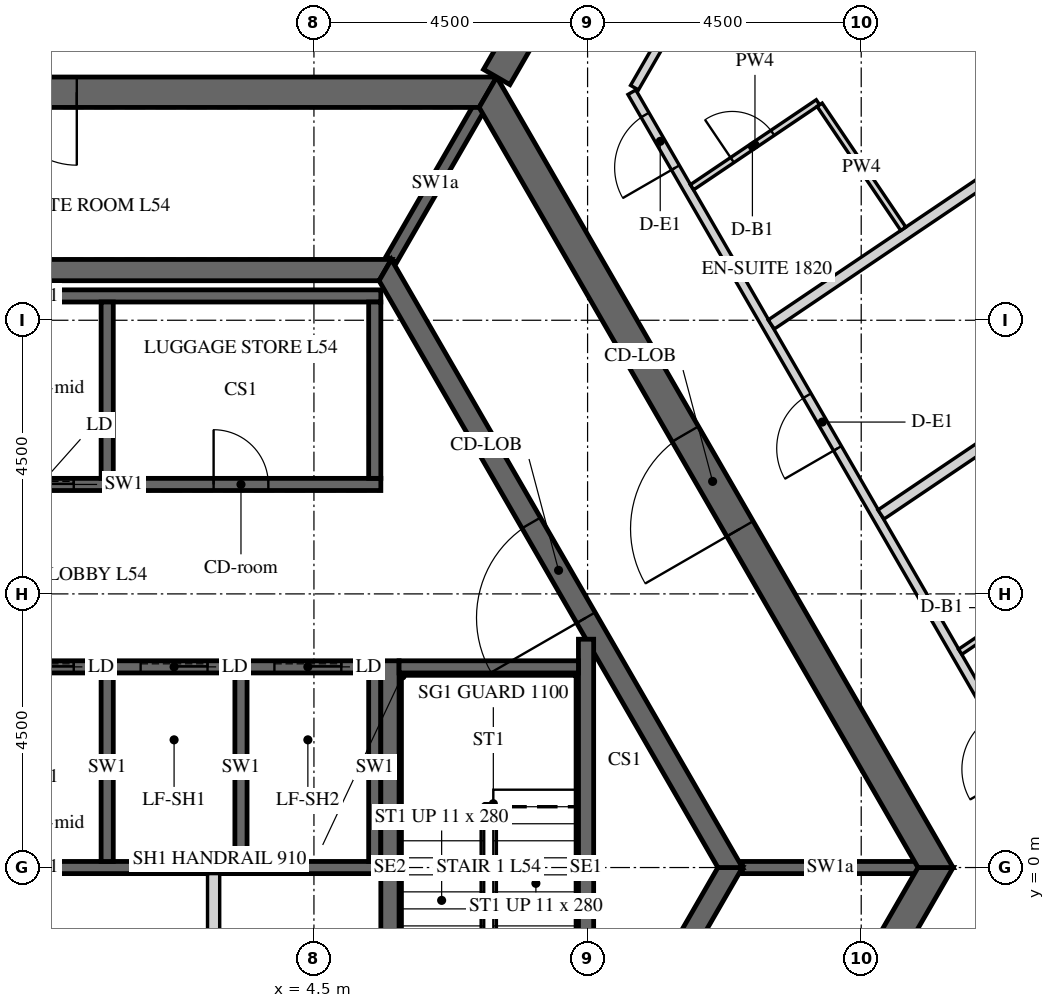
"""IFC4 building model, lengths in metres.
Left out: names, types, materials, properties, quantities, classifications, styles, units other than length and angle.
Written with IfcOpenShell. Run it as: python <this file> out.ifc"""

import sys

from ifc_helpers import new_model, si_unit, direction, frame, frame_2d, origin, place, context, subcontext, project, spatial, polyline, rectangle, outline, extrude, element, fill, save


model = new_model("IFC4")
c1 = context("Model", 3, precision=1e-05, world=origin(), true_north=direction((0.0, 1.0)))
c2 = subcontext(c1, "Body", "Model", "MODEL_VIEW")
j1 = project(units=[si_unit("LENGTHUNIT", "METRE"), si_unit("PLANEANGLEUNIT", "RADIAN")], contexts=[c1])
p1 = place(None, origin())
s1 = spatial("IfcSite", under=j1, at=p1, CompositionType="ELEMENT")
p2 = place(p1, origin())
s2 = spatial("IfcBuilding", under=s1, at=p2, CompositionType="ELEMENT")
p3 = place(p2, frame((0.0, 0.0, 226.8)))
s3 = spatial("IfcBuildingStorey", under=s2, at=p3, CompositionType="ELEMENT", Elevation=226.8)
p4 = place(p3, frame((7.361, -12.75, -0.15), z_axis=(0.0, 0.0, 1.0), x_axis=(0.50000571537, 0.866022103989, 0.0)))
e1 = element("IfcWall", 1, at=p4, inside=s3, PredefinedType="SHEAR", context=c2, shape_type="SweptSolid", body=[
    extrude(outline(polyline([(-0.144, -0.25), (14.867, -0.25), (14.578, 0.25), (0.144, 0.25), (-0.144, -0.25)])), origin(), (0.0, 0.0, 1.0), 3.9),
])
p5 = place(p4, frame((6.49, 0.0, 0.15)))
e2 = element("IfcOpeningElement", 2, at=p5, cuts=e1, PredefinedType="OPENING", context=c2, shape_type="SweptSolid", body=[
    extrude(rectangle(XDim=1.8, YDim=2.4, at=frame_2d((0.9, 1.2))), frame((0.0, 0.26, 0.0), z_axis=(0.0, -1.0, 0.0), x_axis=(1.0, 0.0, 0.0)), (0.0, 0.0, 1.0), 0.52),
])
p6 = place(p3, frame((14.722, 0.0, -0.15), z_axis=(0.0, 0.0, 1.0), x_axis=(-0.50000571537, 0.866022103989, 0.0)))
e3 = element("IfcWall", 3, at=p6, inside=s3, PredefinedType="SHEAR", context=c2, shape_type="SweptSolid", body=[
    extrude(outline(polyline([(-0.144, -0.25), (14.867, -0.25), (14.578, 0.25), (0.144, 0.25), (-0.144, -0.25)])), origin(), (0.0, 0.0, 1.0), 3.9),
])
p7 = place(p6, frame((6.432, 0.0, 0.15)))
e4 = element("IfcOpeningElement", 4, at=p7, cuts=e3, PredefinedType="OPENING", context=c2, shape_type="SweptSolid", body=[
    extrude(rectangle(XDim=1.8, YDim=2.4, at=frame_2d((0.9, 1.2))), frame((0.0, 0.26, 0.0), z_axis=(0.0, -1.0, 0.0), x_axis=(1.0, 0.0, 0.0)), (0.0, 0.0, 1.0), 0.52),
])
p8 = place(p3, frame((7.361, 12.75, -0.15), z_axis=(0.0, 0.0, 1.0), x_axis=(-1.0, 0.0, 0.0)))
e5 = element("IfcWall", 5, at=p8, inside=s3, PredefinedType="SHEAR", context=c2, shape_type="SweptSolid", body=[
    extrude(outline(polyline([(-0.144, -0.25), (14.866, -0.25), (14.578, 0.25), (0.144, 0.25), (-0.144, -0.25)])), origin(), (0.0, 0.0, 1.0), 3.9),
])
p9 = place(p8, frame((6.761, 0.0, 0.15)))
e6 = element("IfcOpeningElement", 6, at=p9, cuts=e5, PredefinedType="OPENING", context=c2, shape_type="SweptSolid", body=[
    extrude(rectangle(XDim=1.2, YDim=2.4, at=frame_2d((0.6, 1.2))), frame((0.0, 0.26, 0.0), z_axis=(0.0, -1.0, 0.0), x_axis=(1.0, 0.0, 0.0)), (0.0, 0.0, 1.0), 0.52),
])
p10 = place(p3, frame((7.506, 13.0, -0.15), z_axis=(0.0, 0.0, 1.0), x_axis=(0.499988271576, 0.866032175087, 0.0)))
e7 = element("IfcWall", 7, at=p10, inside=s3, PredefinedType="SHEAR", context=c2, shape_type="SweptSolid", body=[
    extrude(rectangle(XDim=15.424, YDim=0.5, at=frame_2d((7.712, 0.0))), origin(), (0.0, 0.0, 1.0), 3.9),
])
p11 = place(p10, frame((6.812, 0.0, 0.15)))
e8 = element("IfcOpeningElement", 8, at=p11, cuts=e7, PredefinedType="OPENING", context=c2, shape_type="SweptSolid", body=[
    extrude(rectangle(XDim=1.8, YDim=2.4, at=frame_2d((0.9, 1.2))), frame((0.0, 0.26, 0.0), z_axis=(0.0, -1.0, 0.0), x_axis=(1.0, 0.0, 0.0)), (0.0, 0.0, 1.0), 0.52),
])
p12 = place(p3, frame((5.673, -9.825, -0.15), z_axis=(0.0, 0.0, 1.0), x_axis=(0.499995046907, 0.866028263435, 0.0)))
e9 = element("IfcWall", 9, at=p12, inside=s3, PredefinedType="SHEAR", context=c2, shape_type="SweptSolid", body=[
    extrude(outline(polyline([(-0.101, -0.175), (11.446, -0.175), (11.244, 0.175), (0.101, 0.175), (-0.101, -0.175)])), origin(), (0.0, 0.0, 1.0), 3.9),
])
p13 = place(p12, frame((4.801, 0.0, 0.15)))
e10 = element("IfcOpeningElement", 10, at=p13, cuts=e9, PredefinedType="OPENING", context=c2, shape_type="SweptSolid", body=[
    extrude(rectangle(XDim=1.8, YDim=2.4, at=frame_2d((0.9, 1.2))), frame((0.0, 0.185, 0.0), z_axis=(0.0, -1.0, 0.0), x_axis=(1.0, 0.0, 0.0)), (0.0, 0.0, 1.0), 0.37),
])
p14 = place(p3, frame((11.345, 0.0, -0.15), z_axis=(0.0, 0.0, 1.0), x_axis=(-0.499995046907, 0.866028263435, 0.0)))
e11 = element("IfcWall", 11, at=p14, inside=s3, PredefinedType="SHEAR", context=c2, shape_type="SweptSolid", body=[
    extrude(outline(polyline([(-0.101, -0.175), (11.446, -0.175), (11.244, 0.175), (0.101, 0.175), (-0.101, -0.175)])), origin(), (0.0, 0.0, 1.0), 3.9),
])
p15 = place(p14, frame((4.744, 0.0, 0.15)))
e12 = element("IfcOpeningElement", 12, at=p15, cuts=e11, PredefinedType="OPENING", context=c2, shape_type="SweptSolid", body=[
    extrude(rectangle(XDim=1.8, YDim=2.4, at=frame_2d((0.9, 1.2))), frame((0.0, 0.185, 0.0), z_axis=(0.0, -1.0, 0.0), x_axis=(1.0, 0.0, 0.0)), (0.0, 0.0, 1.0), 0.37),
])
p16 = place(p3, frame((5.673, 9.825, -0.15), z_axis=(0.0, 0.0, 1.0), x_axis=(-1.0, 0.0, 0.0)))
e13 = element("IfcWall", 13, at=p16, inside=s3, PredefinedType="SHEAR", context=c2, shape_type="SweptSolid", body=[
    extrude(outline(polyline([(-0.101, -0.175), (11.446, -0.175), (11.244, 0.175), (0.101, 0.175), (-0.101, -0.175)])), origin(), (0.0, 0.0, 1.0), 3.9),
])
p17 = place(p3, frame((-5.6, 6.3, -0.25), z_axis=(0.0, 0.0, 1.0), x_axis=(1.0, 0.0, 0.0)))
e14 = element("IfcWall", 14, at=p17, inside=s3, PredefinedType="SHEAR", context=c2, shape_type="SweptSolid", body=[
    extrude(rectangle(XDim=11.2, YDim=0.2, at=frame_2d((5.6, 0.0))), origin(), (0.0, 0.0, 1.0), 3.9),
])
p18 = place(p17, frame((8.45, 0.0, 0.25)))
e15 = element("IfcOpeningElement", 15, at=p18, cuts=e14, PredefinedType="OPENING", context=c2, shape_type="SweptSolid", body=[
    extrude(rectangle(XDim=0.9, YDim=2.1, at=frame_2d((0.45, 1.05))), frame((0.0, 0.11, 0.0), z_axis=(0.0, -1.0, 0.0), x_axis=(1.0, 0.0, 0.0)), (0.0, 0.0, 1.0), 0.22),
])
p19 = place(p17, frame((0.65, 0.0, 0.25)))
e16 = element("IfcOpeningElement", 16, at=p19, cuts=e14, PredefinedType="OPENING", context=c2, shape_type="SweptSolid", body=[
    extrude(rectangle(XDim=1.1, YDim=2.1, at=frame_2d((0.55, 1.05))), frame((0.0, 0.11, 0.0), z_axis=(0.0, -1.0, 0.0), x_axis=(1.0, 0.0, 0.0)), (0.0, 0.0, 1.0), 0.22),
])
p20 = place(p17, frame((2.85, 0.0, 0.25)))
e17 = element("IfcOpeningElement", 17, at=p20, cuts=e14, PredefinedType="OPENING", context=c2, shape_type="SweptSolid", body=[
    extrude(rectangle(XDim=1.1, YDim=2.1, at=frame_2d((0.55, 1.05))), frame((0.0, 0.11, 0.0), z_axis=(0.0, -1.0, 0.0), x_axis=(1.0, 0.0, 0.0)), (0.0, 0.0, 1.0), 0.22),
])
p21 = place(p17, frame((5.05, 0.0, 0.25)))
e18 = element("IfcOpeningElement", 18, at=p21, cuts=e14, PredefinedType="OPENING", context=c2, shape_type="SweptSolid", body=[
    extrude(rectangle(XDim=1.1, YDim=2.1, at=frame_2d((0.55, 1.05))), frame((0.0, 0.11, 0.0), z_axis=(0.0, -1.0, 0.0), x_axis=(1.0, 0.0, 0.0)), (0.0, 0.0, 1.0), 0.22),
])
p22 = place(p3, frame((-5.6, 9.4, -0.25), z_axis=(0.0, 0.0, 1.0), x_axis=(1.0, 0.0, 0.0)))
e19 = element("IfcWall", 19, at=p22, inside=s3, PredefinedType="SHEAR", context=c2, shape_type="SweptSolid", body=[
    extrude(rectangle(XDim=11.2, YDim=0.2, at=frame_2d((5.6, 0.0))), origin(), (0.0, 0.0, 1.0), 3.9),
])
for number, where, z_axis, x_axis in (
    (20, (1.1, 6.4, -0.25), (0.0, 0.0, 1.0), (0.0, 1.0, 0.0)),
    (21, (5.5, 6.4, -0.25), (0.0, 0.0, 1.0), (0.0, 1.0, 0.0)),
):
    element("IfcWall", number, at=place(p3, frame(where, z_axis=z_axis, x_axis=x_axis)), inside=s3, PredefinedType="SHEAR", context=c2, shape_type="SweptSolid", body=[
        extrude(rectangle(XDim=2.9, YDim=0.2, at=frame_2d((1.45, 0.0))), origin(), (0.0, 0.0, 1.0), 3.9),
    ])
p23 = place(p3, frame((-5.6, 3.3, -0.25), z_axis=(0.0, 0.0, 1.0), x_axis=(1.0, 0.0, 0.0)))
e22 = element("IfcWall", 22, at=p23, inside=s3, PredefinedType="SHEAR", context=c2, shape_type="SweptSolid", body=[
    extrude(rectangle(XDim=11.2, YDim=0.2, at=frame_2d((5.6, 0.0))), origin(), (0.0, 0.0, 1.0), 3.9),
])
p24 = place(p23, frame((0.65, 0.0, 0.25)))
e23 = element("IfcOpeningElement", 23, at=p24, cuts=e22, PredefinedType="OPENING", context=c2, shape_type="SweptSolid", body=[
    extrude(rectangle(XDim=1.1, YDim=2.1, at=frame_2d((0.55, 1.05))), frame((0.0, 0.11, 0.0), z_axis=(0.0, -1.0, 0.0), x_axis=(1.0, 0.0, 0.0)), (0.0, 0.0, 1.0), 0.22),
])
p25 = place(p23, frame((2.85, 0.0, 0.25)))
e24 = element("IfcOpeningElement", 24, at=p25, cuts=e22, PredefinedType="OPENING", context=c2, shape_type="SweptSolid", body=[
    extrude(rectangle(XDim=1.1, YDim=2.1, at=frame_2d((0.55, 1.05))), frame((0.0, 0.11, 0.0), z_axis=(0.0, -1.0, 0.0), x_axis=(1.0, 0.0, 0.0)), (0.0, 0.0, 1.0), 0.22),
])
p26 = place(p23, frame((5.05, 0.0, 0.25)))
e25 = element("IfcOpeningElement", 25, at=p26, cuts=e22, PredefinedType="OPENING", context=c2, shape_type="SweptSolid", body=[
    extrude(rectangle(XDim=1.1, YDim=2.1, at=frame_2d((0.55, 1.05))), frame((0.0, 0.11, 0.0), z_axis=(0.0, -1.0, 0.0), x_axis=(1.0, 0.0, 0.0)), (0.0, 0.0, 1.0), 0.22),
])
p27 = place(p23, frame((7.25, 0.0, 0.25)))
e26 = element("IfcOpeningElement", 26, at=p27, cuts=e22, PredefinedType="OPENING", context=c2, shape_type="SweptSolid", body=[
    extrude(rectangle(XDim=1.1, YDim=2.1, at=frame_2d((0.55, 1.05))), frame((0.0, 0.11, 0.0), z_axis=(0.0, -1.0, 0.0), x_axis=(1.0, 0.0, 0.0)), (0.0, 0.0, 1.0), 0.22),
])
p28 = place(p23, frame((9.45, 0.0, 0.25)))
e27 = element("IfcOpeningElement", 27, at=p28, cuts=e22, PredefinedType="OPENING", context=c2, shape_type="SweptSolid", body=[
    extrude(rectangle(XDim=1.1, YDim=2.1, at=frame_2d((0.55, 1.05))), frame((0.0, 0.11, 0.0), z_axis=(0.0, -1.0, 0.0), x_axis=(1.0, 0.0, 0.0)), (0.0, 0.0, 1.0), 0.22),
])
p29 = place(p3, frame((-5.6, 0.0, -0.25), z_axis=(0.0, 0.0, 1.0), x_axis=(1.0, 0.0, 0.0)))
e28 = element("IfcWall", 28, at=p29, inside=s3, PredefinedType="SHEAR", context=c2, shape_type="SweptSolid", body=[
    extrude(rectangle(XDim=11.2, YDim=0.2, at=frame_2d((5.6, 0.0))), origin(), (0.0, 0.0, 1.0), 3.9),
])
for number, where, z_axis, x_axis in (
    (29, (1.1, 0.1, -0.25), (0.0, 0.0, 1.0), (0.0, 1.0, 0.0)),
    (30, (3.3, 0.1, -0.25), (0.0, 0.0, 1.0), (0.0, 1.0, 0.0)),
    (31, (5.5, 0.1, -0.25), (0.0, 0.0, 1.0), (0.0, 1.0, 0.0)),
):
    element("IfcWall", number, at=place(p3, frame(where, z_axis=z_axis, x_axis=x_axis)), inside=s3, PredefinedType="SHEAR", context=c2, shape_type="SweptSolid", body=[
        extrude(rectangle(XDim=3.1, YDim=0.2, at=frame_2d((1.55, 0.0))), origin(), (0.0, 0.0, 1.0), 3.9),
    ])
p30 = place(p3, frame((2.85, -3.2, 0.0), z_axis=(0.0, 0.0, 1.0), x_axis=(0.0, 1.0, 0.0)))
e32 = element("IfcWall", 32, at=p30, inside=s3, PredefinedType="PARTITIONING", context=c2, shape_type="SweptSolid", body=[
    extrude(rectangle(XDim=3.1, YDim=0.2, at=frame_2d((1.55, 0.0))), origin(), (0.0, 0.0, 1.0), 3.65),
])
for number, where, z_axis, x_axis in (
    (33, (11.547, 0.0, -0.15), (0.0, 0.0, 1.0), (1.0, 0.0, 0.0)),
    (34, (5.773, 10.0, -0.15), (0.0, 0.0, 1.0), (0.5, 0.866, 0.0)),
):
    element("IfcWall", number, at=place(p3, frame(where, z_axis=z_axis, x_axis=x_axis)), inside=s3, PredefinedType="SHEAR", context=c2, shape_type="SweptSolid", body=[
        extrude(rectangle(XDim=2.887, YDim=0.2, at=frame_2d((1.443, 0.0))), origin(), (0.0, 0.0, 1.0), 3.9),
    ])
p31 = place(p3, frame((5.75, -3.4, -0.25), z_axis=(0.0, 0.0, 1.0), x_axis=(0.0, 1.0, 0.0)))
e35 = element("IfcWall", 35, at=p31, inside=s3, PredefinedType="SHEAR", context=c2, shape_type="SweptSolid", body=[
    extrude(rectangle(XDim=6.8, YDim=0.3, at=frame_2d((3.4, 0.0))), origin(), (0.0, 0.0, 1.0), 3.9),
])
p32 = place(p3, frame((8.975, -3.755, -0.25), z_axis=(0.0, 0.0, 1.0), x_axis=(0.0, 1.0, 0.0)))
e36 = element("IfcWall", 36, at=p32, inside=s3, PredefinedType="SHEAR", context=c2, shape_type="SweptSolid", body=[
    extrude(rectangle(XDim=7.51, YDim=0.25, at=frame_2d((3.755, 0.0))), origin(), (0.0, 0.0, 1.0), 3.9),
])
p33 = place(p3, frame((5.9, 3.3, -0.25), z_axis=(0.0, 0.0, 1.0), x_axis=(1.0, 0.0, 0.0)))
e37 = element("IfcWall", 37, at=p33, inside=s3, PredefinedType="SHEAR", context=c2, shape_type="SweptSolid", body=[
    extrude(rectangle(XDim=2.95, YDim=0.2, at=frame_2d((1.475, 0.0))), origin(), (0.0, 0.0, 1.0), 3.9),
])
p34 = place(p3, frame((9.772, -12.675, 0.0), z_axis=(0.0, 0.0, 1.0), x_axis=(0.499996322767, 0.866027526826, 0.0)))
e38 = element("IfcWall", 38, at=p34, inside=s3, PredefinedType="PARTITIONING", context=c2, shape_type="SweptSolid", body=[
    extrude(rectangle(XDim=14.636, YDim=0.15, at=frame_2d((7.318, 0.0))), origin(), (0.0, 0.0, 1.0), 2.988),
])
p35 = place(p34, frame((5.309, 0.0, 0.0)))
e39 = element("IfcOpeningElement", 39, at=p35, cuts=e38, PredefinedType="OPENING", context=c2, shape_type="SweptSolid", body=[
    extrude(rectangle(XDim=1.0, YDim=2.1, at=frame_2d((0.5, 1.05))), frame((0.0, 0.085, 0.0), z_axis=(0.0, -1.0, 0.0), x_axis=(1.0, 0.0, 0.0)), (0.0, 0.0, 1.0), 0.17),
])
p36 = place(p34, frame((13.486, 0.0, 0.0)))
e40 = element("IfcOpeningElement", 40, at=p36, cuts=e38, PredefinedType="OPENING", context=c2, shape_type="SweptSolid", body=[
    extrude(rectangle(XDim=1.0, YDim=2.1, at=frame_2d((0.5, 1.05))), frame((0.0, 0.085, 0.0), z_axis=(0.0, -1.0, 0.0), x_axis=(1.0, 0.0, 0.0)), (0.0, 0.0, 1.0), 0.17),
])
p37 = place(p3, frame((17.046, 0.075, 0.0), z_axis=(0.0, 0.0, 1.0), x_axis=(-0.499996322767, 0.866027526826, 0.0)))
e41 = element("IfcWall", 41, at=p37, inside=s3, PredefinedType="PARTITIONING", context=c2, shape_type="SweptSolid", body=[
    extrude(rectangle(XDim=14.636, YDim=0.15, at=frame_2d((7.318, 0.0))), origin(), (0.0, 0.0, 1.0), 2.988),
])
p38 = place(p37, frame((1.781, 0.0, 0.0)))
e42 = element("IfcOpeningElement", 42, at=p38, cuts=e41, PredefinedType="OPENING", context=c2, shape_type="SweptSolid", body=[
    extrude(rectangle(XDim=1.0, YDim=2.1, at=frame_2d((0.5, 1.05))), frame((0.0, 0.085, 0.0), z_axis=(0.0, -1.0, 0.0), x_axis=(1.0, 0.0, 0.0)), (0.0, 0.0, 1.0), 0.17),
])
p39 = place(p37, frame((7.872, 0.0, 0.0)))
e43 = element("IfcOpeningElement", 43, at=p39, cuts=e41, PredefinedType="OPENING", context=c2, shape_type="SweptSolid", body=[
    extrude(rectangle(XDim=1.0, YDim=2.1, at=frame_2d((0.5, 1.05))), frame((0.0, 0.085, 0.0), z_axis=(0.0, -1.0, 0.0), x_axis=(1.0, 0.0, 0.0)), (0.0, 0.0, 1.0), 0.17),
])
p40 = place(p37, frame((13.203, 0.0, 0.0)))
e44 = element("IfcOpeningElement", 44, at=p40, cuts=e41, PredefinedType="OPENING", context=c2, shape_type="SweptSolid", body=[
    extrude(rectangle(XDim=1.0, YDim=2.1, at=frame_2d((0.5, 1.05))), frame((0.0, 0.085, 0.0), z_axis=(0.0, -1.0, 0.0), x_axis=(1.0, 0.0, 0.0)), (0.0, 0.0, 1.0), 0.17),
])
p41 = place(p3, frame((9.772, 12.825, 0.0), z_axis=(0.0, 0.0, 1.0), x_axis=(0.499989830942, 0.866031274813, 0.0)))
e45 = element("IfcWall", 45, at=p41, inside=s3, PredefinedType="PARTITIONING", context=c2, shape_type="SweptSolid", body=[
    extrude(rectangle(XDim=7.93, YDim=0.15, at=frame_2d((3.965, 0.0))), origin(), (0.0, 0.0, 1.0), 2.988),
])
p42 = place(p3, frame((17.323, 5.029, 0.0), z_axis=(0.0, 0.0, 1.0), x_axis=(-0.829031379595, -0.559202084802, 0.0)))
e46 = element("IfcWall", 46, at=p42, inside=s3, PredefinedType="PARTITIONING", context=c2, shape_type="SweptSolid", body=[
    extrude(rectangle(XDim=2.648, YDim=0.1, at=frame_2d((1.324, 0.0))), origin(), (0.0, 0.0, 1.0), 2.988),
])
p43 = place(p42, frame((0.95, 0.0, 0.0)))
e47 = element("IfcOpeningElement", 47, at=p43, cuts=e46, PredefinedType="OPENING", context=c2, shape_type="SweptSolid", body=[
    extrude(rectangle(XDim=0.8, YDim=2.1, at=frame_2d((0.4, 1.05))), frame((0.0, 0.06, 0.0), z_axis=(0.0, -1.0, 0.0), x_axis=(1.0, 0.0, 0.0)), (0.0, 0.0, 1.0), 0.12),
])
p44 = place(p3, frame((24.389, 12.931, 0.0), z_axis=(0.0, 0.0, 1.0), x_axis=(-0.829037426209, -0.559193120438, 0.0)))
e48 = element("IfcWall", 48, at=p44, inside=s3, PredefinedType="PARTITIONING", context=c2, shape_type="SweptSolid", body=[
    extrude(rectangle(XDim=12.742, YDim=0.18, at=frame_2d((6.371, 0.0))), origin(), (0.0, 0.0, 1.0), 2.988),
])
p45 = place(p3, frame((22.376, 15.915, 0.0), z_axis=(0.0, 0.0, 1.0), x_axis=(-0.829037148953, -0.559193531487, 0.0)))
e49 = element("IfcWall", 49, at=p45, inside=s3, PredefinedType="PARTITIONING", context=c2, shape_type="SweptSolid", body=[
    extrude(rectangle(XDim=12.491, YDim=0.18, at=frame_2d((6.246, 0.0))), origin(), (0.0, 0.0, 1.0), 2.988),
])
p46 = place(p3, frame((10.717, 11.188, 0.0), z_axis=(0.0, 0.0, 1.0), x_axis=(0.829016292589, 0.559224451024, 0.0)))
e50 = element("IfcWall", 50, at=p46, inside=s3, PredefinedType="PARTITIONING", context=c2, shape_type="SweptSolid", body=[
    extrude(rectangle(XDim=2.499, YDim=0.1, at=frame_2d((1.249, 0.0))), origin(), (0.0, 0.0, 1.0), 2.988),
])
p47 = place(p46, frame((0.799, 0.0, 0.0)))
e51 = element("IfcOpeningElement", 51, at=p47, cuts=e50, PredefinedType="OPENING", context=c2, shape_type="SweptSolid", body=[
    extrude(rectangle(XDim=0.8, YDim=2.1, at=frame_2d((0.4, 1.05))), frame((0.0, 0.06, 0.0), z_axis=(0.0, -1.0, 0.0), x_axis=(1.0, 0.0, 0.0)), (0.0, 0.0, 1.0), 0.12),
])
p48 = place(p3, frame((12.816, 12.543, 0.0), z_axis=(0.0, 0.0, 1.0), x_axis=(0.559181331227, -0.829045378015, 0.0)))
e52 = element("IfcWall", 52, at=p48, inside=s3, PredefinedType="PARTITIONING", context=c2, shape_type="SweptSolid", body=[
    extrude(rectangle(XDim=2.46, YDim=0.1, at=frame_2d((1.23, 0.0))), origin(), (0.0, 0.0, 1.0), 2.988),
])
p49 = place(p7, origin())
e53 = element("IfcDoor", 53, at=p49, inside=s3, OperationType="DOUBLE_DOOR_SINGLE_SWING", PredefinedType="DOOR", context=c2, shape_type="SweptSolid", body=[
    extrude(rectangle(XDim=1.8, YDim=2.4, at=frame_2d((0.9, 1.2))), frame((0.0, 0.025, 0.0), z_axis=(0.0, -1.0, 0.0), x_axis=(1.0, 0.0, 0.0)), (0.0, 0.0, 1.0), 0.05),
])
fill(e4, e53)
p50 = place(p9, origin())
e54 = element("IfcDoor", 54, at=p50, inside=s3, OperationType="SINGLE_SWING_LEFT", PredefinedType="DOOR", context=c2, shape_type="SweptSolid", body=[
    extrude(rectangle(XDim=1.2, YDim=2.4, at=frame_2d((0.6, 1.2))), frame((0.0, 0.025, 0.0), z_axis=(0.0, -1.0, 0.0), x_axis=(1.0, 0.0, 0.0)), (0.0, 0.0, 1.0), 0.05),
])
fill(e6, e54)
p51 = place(p15, origin())
e55 = element("IfcDoor", 55, at=p51, inside=s3, OperationType="DOUBLE_DOOR_SINGLE_SWING", PredefinedType="DOOR", context=c2, shape_type="SweptSolid", body=[
    extrude(rectangle(XDim=1.8, YDim=2.4, at=frame_2d((0.9, 1.2))), frame((0.0, 0.025, 0.0), z_axis=(0.0, -1.0, 0.0), x_axis=(1.0, 0.0, 0.0)), (0.0, 0.0, 1.0), 0.05),
])
fill(e12, e55)
p52 = place(p18, origin())
e56 = element("IfcDoor", 56, at=p52, inside=s3, OperationType="SINGLE_SWING_LEFT", PredefinedType="DOOR", context=c2, shape_type="SweptSolid", body=[
    extrude(rectangle(XDim=0.9, YDim=2.1, at=frame_2d((0.45, 1.05))), frame((0.0, 0.025, 0.0), z_axis=(0.0, -1.0, 0.0), x_axis=(1.0, 0.0, 0.0)), (0.0, 0.0, 1.0), 0.05),
])
fill(e15, e56)
p53 = place(p21, origin())
e57 = element("IfcDoor", 57, at=p53, inside=s3, OperationType="SLIDING_TO_LEFT", PredefinedType="DOOR", context=c2, shape_type="SweptSolid", body=[
    extrude(rectangle(XDim=1.1, YDim=2.1, at=frame_2d((0.55, 1.05))), frame((0.0, 0.025, 0.0), z_axis=(0.0, -1.0, 0.0), x_axis=(1.0, 0.0, 0.0)), (0.0, 0.0, 1.0), 0.05),
])
fill(e18, e57)
p54 = place(p26, origin())
e58 = element("IfcDoor", 58, at=p54, inside=s3, OperationType="SLIDING_TO_LEFT", PredefinedType="DOOR", context=c2, shape_type="SweptSolid", body=[
    extrude(rectangle(XDim=1.1, YDim=2.1, at=frame_2d((0.55, 1.05))), frame((0.0, 0.025, 0.0), z_axis=(0.0, -1.0, 0.0), x_axis=(1.0, 0.0, 0.0)), (0.0, 0.0, 1.0), 0.05),
])
fill(e25, e58)
p55 = place(p27, origin())
e59 = element("IfcDoor", 59, at=p55, inside=s3, OperationType="SLIDING_TO_LEFT", PredefinedType="DOOR", context=c2, shape_type="SweptSolid", body=[
    extrude(rectangle(XDim=1.1, YDim=2.1, at=frame_2d((0.55, 1.05))), frame((0.0, 0.025, 0.0), z_axis=(0.0, -1.0, 0.0), x_axis=(1.0, 0.0, 0.0)), (0.0, 0.0, 1.0), 0.05),
])
fill(e26, e59)
p56 = place(p28, origin())
e60 = element("IfcDoor", 60, at=p56, inside=s3, OperationType="SLIDING_TO_LEFT", PredefinedType="DOOR", context=c2, shape_type="SweptSolid", body=[
    extrude(rectangle(XDim=1.1, YDim=2.1, at=frame_2d((0.55, 1.05))), frame((0.0, 0.025, 0.0), z_axis=(0.0, -1.0, 0.0), x_axis=(1.0, 0.0, 0.0)), (0.0, 0.0, 1.0), 0.05),
])
fill(e27, e60)
p57 = place(p39, origin())
e61 = element("IfcDoor", 61, at=p57, inside=s3, OperationType="SINGLE_SWING_RIGHT", PredefinedType="DOOR", context=c2, shape_type="SweptSolid", body=[
    extrude(rectangle(XDim=1.0, YDim=2.1, at=frame_2d((0.5, 1.05))), frame((0.0, 0.025, 0.0), z_axis=(0.0, -1.0, 0.0), x_axis=(1.0, 0.0, 0.0)), (0.0, 0.0, 1.0), 0.05),
])
fill(e43, e61)
p58 = place(p40, origin())
e62 = element("IfcDoor", 62, at=p58, inside=s3, OperationType="SINGLE_SWING_LEFT", PredefinedType="DOOR", context=c2, shape_type="SweptSolid", body=[
    extrude(rectangle(XDim=1.0, YDim=2.1, at=frame_2d((0.5, 1.05))), frame((0.0, 0.025, 0.0), z_axis=(0.0, -1.0, 0.0), x_axis=(1.0, 0.0, 0.0)), (0.0, 0.0, 1.0), 0.05),
])
fill(e44, e62)
p59 = place(p47, origin())
e63 = element("IfcDoor", 63, at=p59, inside=s3, OperationType="SINGLE_SWING_RIGHT", PredefinedType="DOOR", context=c2, shape_type="SweptSolid", body=[
    extrude(rectangle(XDim=0.8, YDim=2.1, at=frame_2d((0.4, 1.05))), frame((0.0, 0.025, 0.0), z_axis=(0.0, -1.0, 0.0), x_axis=(1.0, 0.0, 0.0)), (0.0, 0.0, 1.0), 0.05),
])
fill(e51, e63)
save(model, sys.argv[1])
